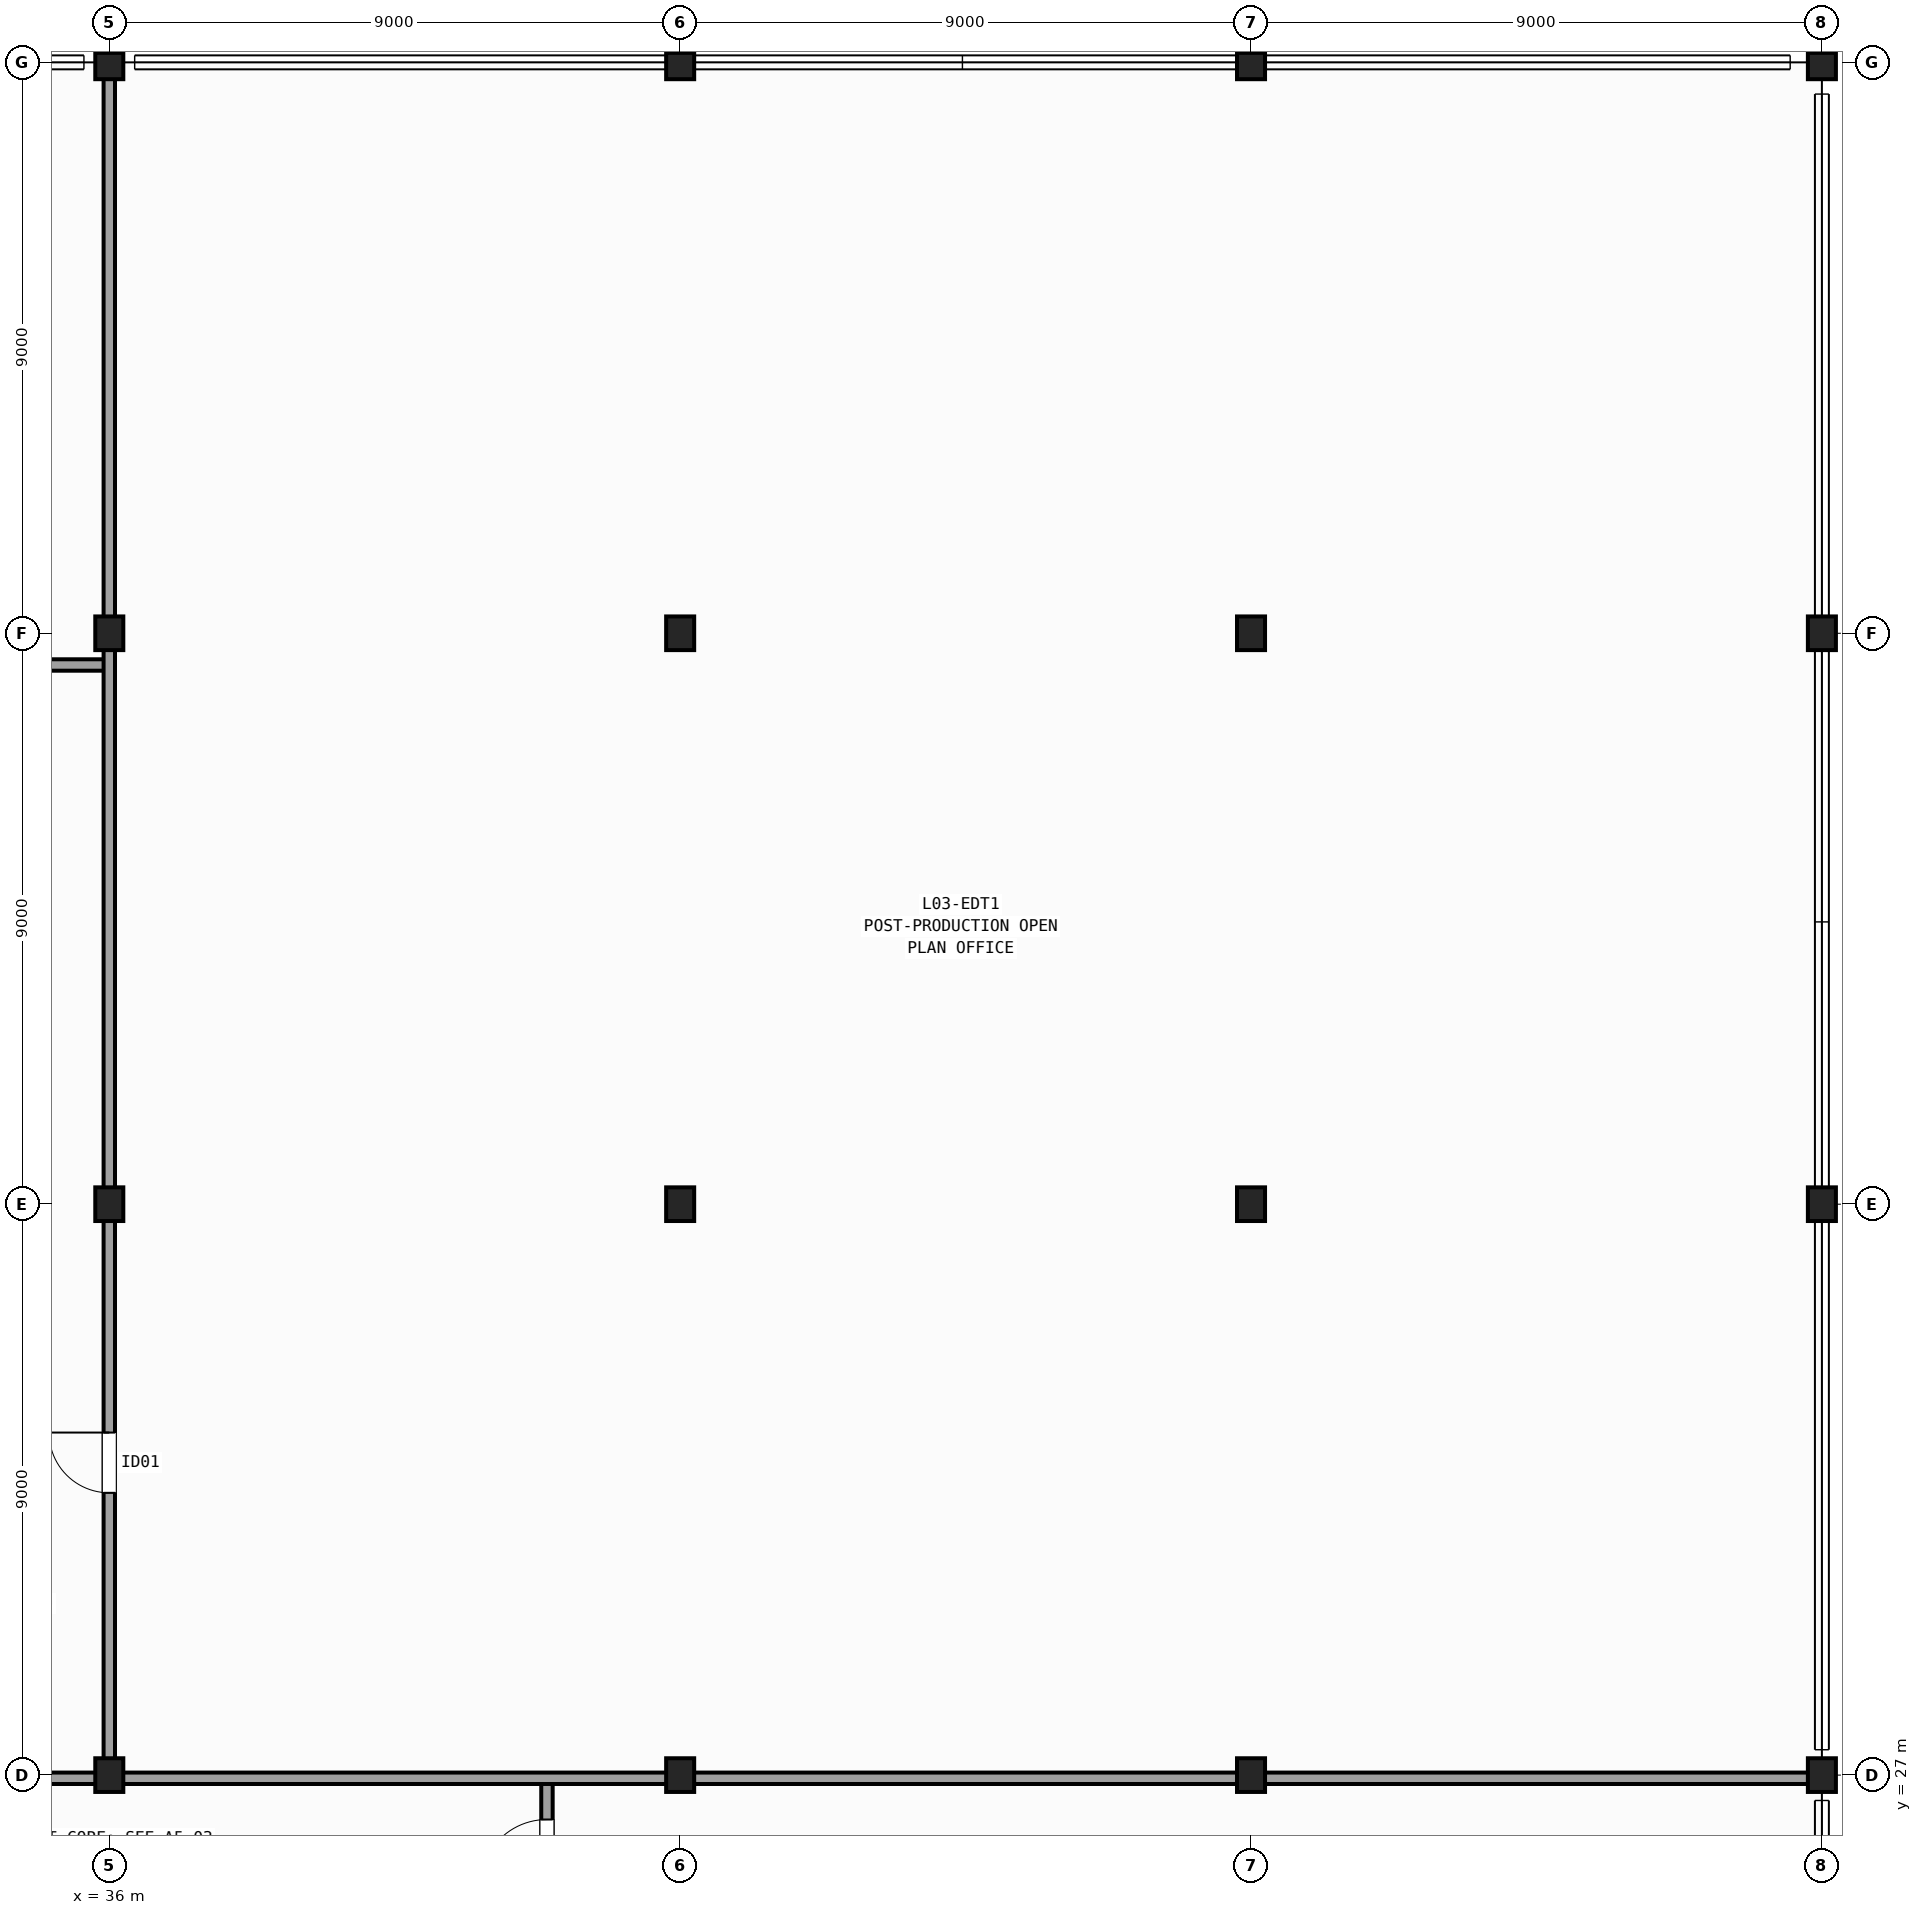
"""IFC4 building model, lengths in metres.
Left out: names, types, materials, properties, quantities, classifications, styles, units other than length and angle.
Written with IfcOpenShell. Run it as: python <this file> out.ifc"""

import sys

from ifc_helpers import new_model, si_unit, direction, frame, frame_2d, origin, origin_2d, place, context, subcontext, project, spatial, rectangle, i_section, extrude, element, fill, save


model = new_model("IFC4")
c1 = context("Model", 3, precision=1e-05, world=origin(), true_north=direction((0.0, 1.0)))
c2 = subcontext(c1, "Body", "Model", "MODEL_VIEW")
j1 = project(units=[si_unit("LENGTHUNIT", "METRE"), si_unit("PLANEANGLEUNIT", "RADIAN")], contexts=[c1])
p1 = place(None, origin())
s1 = spatial("IfcSite", under=j1, at=p1, CompositionType="ELEMENT")
p2 = place(p1, origin())
s2 = spatial("IfcBuilding", under=s1, at=p2, CompositionType="ELEMENT")
p3 = place(p2, frame((0.0, 0.0, 16.2)))
s3 = spatial("IfcBuildingStorey", under=s2, at=p3, CompositionType="ELEMENT", Elevation=16.2)
for number, where, z_axis, x_axis in (
    (1, (36.0, 27.0, 0.0), (0.0, 0.0, 1.0), (1.0, 0.0, 0.0)),
    (2, (36.0, 36.0, 0.0), (0.0, 0.0, 1.0), (1.0, 0.0, 0.0)),
    (3, (36.0, 45.0, 0.0), (0.0, 0.0, 1.0), (1.0, 0.0, 0.0)),
    (4, (36.0, 54.0, 0.0), (0.0, 0.0, 1.0), (1.0, 0.0, 0.0)),
    (5, (45.0, 27.0, 0.0), (0.0, 0.0, 1.0), (1.0, 0.0, 0.0)),
    (6, (45.0, 36.0, 0.0), (0.0, 0.0, 1.0), (1.0, 0.0, 0.0)),
    (7, (45.0, 45.0, 0.0), (0.0, 0.0, 1.0), (1.0, 0.0, 0.0)),
    (8, (45.0, 54.0, 0.0), (0.0, 0.0, 1.0), (1.0, 0.0, 0.0)),
    (9, (54.0, 27.0, 0.0), (0.0, 0.0, 1.0), (1.0, 0.0, 0.0)),
    (10, (54.0, 36.0, 0.0), (0.0, 0.0, 1.0), (1.0, 0.0, 0.0)),
    (11, (54.0, 45.0, 0.0), (0.0, 0.0, 1.0), (1.0, 0.0, 0.0)),
    (12, (54.0, 54.0, 0.0), (0.0, 0.0, 1.0), (1.0, 0.0, 0.0)),
    (13, (63.0, 27.0, 0.0), (0.0, 0.0, 1.0), (1.0, 0.0, 0.0)),
    (14, (63.0, 36.0, 0.0), (0.0, 0.0, 1.0), (1.0, 0.0, 0.0)),
    (15, (63.0, 45.0, 0.0), (0.0, 0.0, 1.0), (1.0, 0.0, 0.0)),
    (16, (63.0, 54.0, 0.0), (0.0, 0.0, 1.0), (1.0, 0.0, 0.0)),
):
    element("IfcColumn", number, at=place(p3, frame(where, z_axis=z_axis, x_axis=x_axis)), inside=s3, PredefinedType="COLUMN", context=c2, shape_type="SweptSolid", body=[
        extrude(i_section(OverallWidth=0.442, OverallDepth=0.531, WebThickness=0.066, FlangeThickness=0.106, FilletRadius=0.015, at=origin_2d()), origin(), (0.0, 0.0, 1.0), 5.0),
    ])
p4 = place(p3, frame((42.9, 24.6, 0.0), z_axis=(0.0, 0.0, 1.0), x_axis=(0.0, 1.0, 0.0)))
e17 = element("IfcWall", 17, at=p4, inside=s3, PredefinedType="PARTITIONING", context=c2, shape_type="SweptSolid", body=[
    extrude(rectangle(XDim=2.35, YDim=0.18, at=frame_2d((1.175, 0.0))), origin(), (0.0, 0.0, 1.0), 3.733),
])
p5 = place(p4, frame((0.65, 0.0, 0.0)))
e18 = element("IfcOpeningElement", 18, at=p5, cuts=e17, PredefinedType="OPENING", context=c2, shape_type="SweptSolid", body=[
    extrude(rectangle(XDim=1.05, YDim=2.15, at=frame_2d((0.525, 1.075))), frame((0.0, 0.1, 0.0), z_axis=(0.0, -1.0, 0.0), x_axis=(1.0, 0.0, 0.0)), (0.0, 0.0, 1.0), 0.2),
])
p6 = place(p3, frame((27.1, 26.95, 0.0), z_axis=(0.0, 0.0, 1.0), x_axis=(1.0, 0.0, 0.0)))
e19 = element("IfcWall", 19, at=p6, inside=s3, PredefinedType="PARTITIONING", context=c2, shape_type="SweptSolid", body=[
    extrude(rectangle(XDim=35.9, YDim=0.18, at=frame_2d((17.95, 0.0))), origin(), (0.0, 0.0, 1.0), 3.733),
])
p7 = place(p3, frame((11.1, 44.5, 0.0), z_axis=(0.0, 0.0, 1.0), x_axis=(1.0, 0.0, 0.0)))
e20 = element("IfcWall", 20, at=p7, inside=s3, PredefinedType="PARTITIONING", context=c2, shape_type="SweptSolid", body=[
    extrude(rectangle(XDim=24.9, YDim=0.18, at=frame_2d((12.45, 0.0))), origin(), (0.0, 0.0, 1.0), 3.805),
])
p8 = place(p7, frame((4.5, 0.0, 0.0)))
e21 = element("IfcOpeningElement", 21, at=p8, cuts=e20, PredefinedType="OPENING", context=c2, shape_type="SweptSolid", body=[
    extrude(rectangle(XDim=0.86, YDim=2.05, at=frame_2d((0.43, 1.025))), frame((0.0, 0.1, 0.0), z_axis=(0.0, -1.0, 0.0), x_axis=(1.0, 0.0, 0.0)), (0.0, 0.0, 1.0), 0.2),
])
p9 = place(p3, frame((36.0, 26.95, 0.0), z_axis=(0.0, 0.0, 1.0), x_axis=(0.0, 1.0, 0.0)))
e22 = element("IfcWall", 22, at=p9, inside=s3, PredefinedType="PARTITIONING", context=c2, shape_type="SweptSolid", body=[
    extrude(rectangle(XDim=27.05, YDim=0.18, at=frame_2d((13.525, 0.0))), origin(), (0.0, 0.0, 1.0), 3.733),
])
p10 = place(p9, frame((4.5, 0.0, 0.0)))
e23 = element("IfcOpeningElement", 23, at=p10, cuts=e22, PredefinedType="OPENING", context=c2, shape_type="SweptSolid", body=[
    extrude(rectangle(XDim=0.95, YDim=2.1, at=frame_2d((0.475, 1.05))), frame((0.0, 0.1, 0.0), z_axis=(0.0, -1.0, 0.0), x_axis=(1.0, 0.0, 0.0)), (0.0, 0.0, 1.0), 0.2),
])
p11 = place(p5, origin())
e24 = element("IfcDoor", 24, at=p11, inside=s3, OperationType="SINGLE_SWING_LEFT", PredefinedType="DOOR", context=c2, shape_type="SweptSolid", body=[
    extrude(rectangle(XDim=1.05, YDim=2.15, at=frame_2d((0.525, 1.075))), frame((0.0, 0.025, 0.0), z_axis=(0.0, -1.0, 0.0), x_axis=(1.0, 0.0, 0.0)), (0.0, 0.0, 1.0), 0.05),
])
fill(e18, e24)
p12 = place(p10, origin())
e25 = element("IfcDoor", 25, at=p12, inside=s3, OperationType="SINGLE_SWING_RIGHT", PredefinedType="DOOR", context=c2, shape_type="SweptSolid", body=[
    extrude(rectangle(XDim=0.95, YDim=2.1, at=frame_2d((0.475, 1.05))), frame((0.0, 0.025, 0.0), z_axis=(0.0, -1.0, 0.0), x_axis=(1.0, 0.0, 0.0)), (0.0, 0.0, 1.0), 0.05),
])
fill(e23, e25)
save(model, sys.argv[1])
